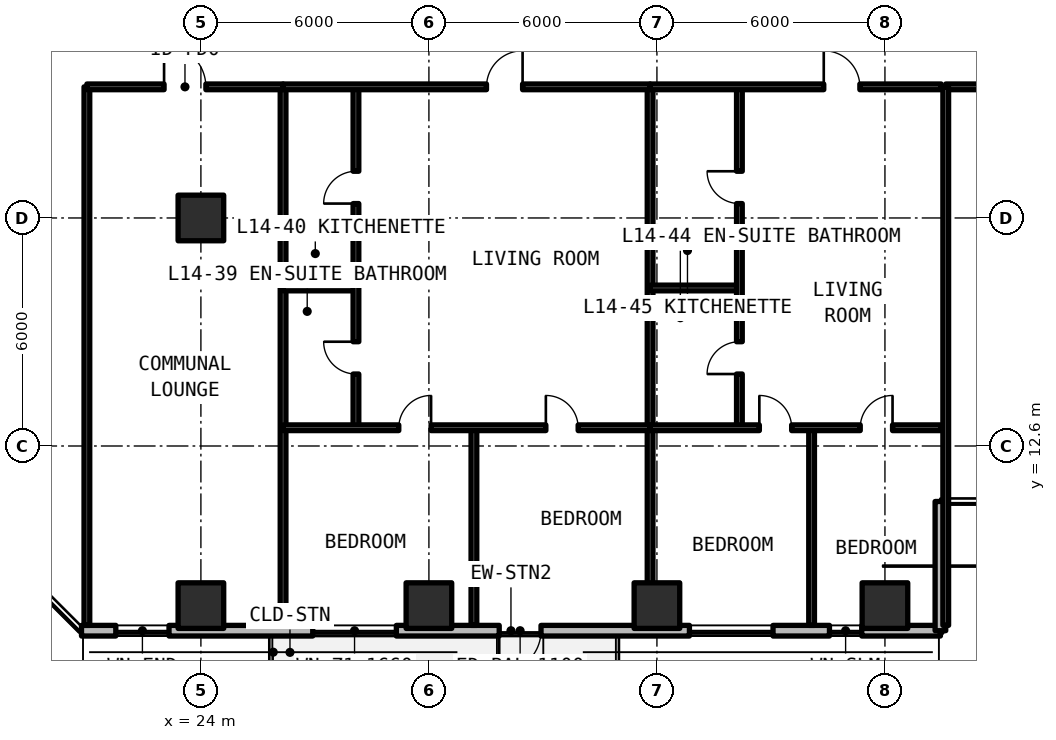
"""IFC4 building model, lengths in metres.
Left out: names, types, materials, properties, quantities, classifications, styles, units other than length and angle.
Written with IfcOpenShell. Run it as: python <this file> out.ifc"""

import sys

from ifc_helpers import new_model, si_unit, direction, frame, frame_2d, origin, origin_2d, place, context, subcontext, project, spatial, rectangle, extrude, element, fill, save


model = new_model("IFC4")
c1 = context("Model", 3, precision=1e-05, world=origin(), true_north=direction((0.0, 1.0)))
c2 = subcontext(c1, "Body", "Model", "MODEL_VIEW")
j1 = project(units=[si_unit("LENGTHUNIT", "METRE"), si_unit("PLANEANGLEUNIT", "RADIAN")], contexts=[c1])
p1 = place(None, origin())
s1 = spatial("IfcSite", under=j1, at=p1, CompositionType="ELEMENT")
p2 = place(p1, origin())
s2 = spatial("IfcBuilding", under=s1, at=p2, CompositionType="ELEMENT")
p3 = place(p2, frame((0.0, 0.0, 52.14)))
s3 = spatial("IfcBuildingStorey", under=s2, at=p3, CompositionType="ELEMENT", Elevation=52.14)
for number, where, z_axis, x_axis in (
    (1, (24.0, 18.6, 0.0), (0.0, 0.0, 1.0), (1.0, 0.0, 0.0)),
    (2, (24.0, 8.4, 0.0), (0.0, 0.0, 1.0), (1.0, 0.0, 0.0)),
    (3, (30.0, 8.4, 0.0), (0.0, 0.0, 1.0), (1.0, 0.0, 0.0)),
    (4, (36.0, 8.4, 0.0), (0.0, 0.0, 1.0), (1.0, 0.0, 0.0)),
    (5, (42.0, 8.4, 0.0), (0.0, 0.0, 1.0), (1.0, 0.0, 0.0)),
):
    element("IfcColumn", number, at=place(p3, frame(where, z_axis=z_axis, x_axis=x_axis)), inside=s3, PredefinedType="COLUMN", context=c2, shape_type="SweptSolid", body=[
        extrude(rectangle(XDim=1.2, YDim=1.2, at=origin_2d()), origin(), (0.0, 0.0, 1.0), 3.3),
    ])
p4 = place(p3, frame((20.858, 7.74, 0.0), z_axis=(0.0, 0.0, 1.0), x_axis=(1.0, 0.0, 0.0)))
e6 = element("IfcWall", 6, at=p4, inside=s3, PredefinedType="SOLIDWALL", context=c2, shape_type="SweptSolid", body=[
    extrude(rectangle(XDim=22.602, YDim=0.28, at=frame_2d((11.301, 0.0))), origin(), (0.0, 0.0, 1.0), 3.08),
])
p5 = place(p4, frame((10.992, 0.0, 0.0)))
e7 = element("IfcOpeningElement", 7, at=p5, cuts=e6, PredefinedType="OPENING", context=c2, shape_type="SweptSolid", body=[
    extrude(rectangle(XDim=1.1, YDim=2.15, at=frame_2d((0.55, 1.075))), frame((0.0, 0.15, 0.0), z_axis=(0.0, -1.0, 0.0), x_axis=(1.0, 0.0, 0.0)), (0.0, 0.0, 1.0), 0.3),
])
p6 = place(p4, frame((0.903, 0.0, 0.78)))
e8 = element("IfcOpeningElement", 8, at=p6, cuts=e6, PredefinedType="OPENING", context=c2, shape_type="SweptSolid", body=[
    extrude(rectangle(XDim=1.4, YDim=1.65, at=frame_2d((0.7, 0.825))), frame((0.0, 0.15, 0.0), z_axis=(0.0, -1.0, 0.0), x_axis=(1.0, 0.0, 0.0)), (0.0, 0.0, 1.0), 0.3),
])
p7 = place(p4, frame((6.085, 0.0, 0.78)))
e9 = element("IfcOpeningElement", 9, at=p7, cuts=e6, PredefinedType="OPENING", context=c2, shape_type="SweptSolid", body=[
    extrude(rectangle(XDim=2.2, YDim=1.66, at=frame_2d((1.1, 0.83))), frame((0.0, 0.15, 0.0), z_axis=(0.0, -1.0, 0.0), x_axis=(1.0, 0.0, 0.0)), (0.0, 0.0, 1.0), 0.3),
])
p8 = place(p4, frame((15.997, 0.0, 0.78)))
e10 = element("IfcOpeningElement", 10, at=p8, cuts=e6, PredefinedType="OPENING", context=c2, shape_type="SweptSolid", body=[
    extrude(rectangle(XDim=2.2, YDim=1.66, at=frame_2d((1.1, 0.83))), frame((0.0, 0.15, 0.0), z_axis=(0.0, -1.0, 0.0), x_axis=(1.0, 0.0, 0.0)), (0.0, 0.0, 1.0), 0.3),
])
p9 = place(p4, frame((19.682, 0.0, 0.78)))
e11 = element("IfcOpeningElement", 11, at=p9, cuts=e6, PredefinedType="OPENING", context=c2, shape_type="SweptSolid", body=[
    extrude(rectangle(XDim=0.85, YDim=1.65, at=frame_2d((0.425, 0.825))), frame((0.0, 0.15, 0.0), z_axis=(0.0, -1.0, 0.0), x_axis=(1.0, 0.0, 0.0)), (0.0, 0.0, 1.0), 0.3),
])
p10 = place(p3, frame((43.46, 7.74, 0.0), z_axis=(0.0, 0.0, 1.0), x_axis=(0.0, 1.0, 0.0)))
e12 = element("IfcWall", 12, at=p10, inside=s3, PredefinedType="SOLIDWALL", context=c2, shape_type="SweptSolid", body=[
    extrude(rectangle(XDim=3.4, YDim=0.28, at=frame_2d((1.7, 0.0))), origin(), (0.0, 0.0, 1.0), 3.08),
])
p11 = place(p3, frame((43.6, 22.05, 0.0), z_axis=(0.0, 0.0, 1.0), x_axis=(1.0, 0.0, 0.0)))
e13 = element("IfcWall", 13, at=p11, inside=s3, PredefinedType="SOLIDWALL", context=c2, shape_type="SweptSolid", body=[
    extrude(rectangle(XDim=8.4, YDim=0.15, at=frame_2d((4.2, 0.0))), origin(), (0.0, 0.0, 1.0), 2.35),
])
p12 = place(p11, frame((3.65, 0.0, 0.0)))
e14 = element("IfcOpeningElement", 14, at=p12, cuts=e13, PredefinedType="OPENING", context=c2, shape_type="SweptSolid", body=[
    extrude(rectangle(XDim=1.1, YDim=2.15, at=frame_2d((0.55, 1.075))), frame((0.0, 0.085, 0.0), z_axis=(0.0, -1.0, 0.0), x_axis=(1.0, 0.0, 0.0)), (0.0, 0.0, 1.0), 0.17),
])
for number, where, z_axis, x_axis in (
    (15, (43.6, 7.88, 0.0), (0.0, 0.0, 1.0), (0.0, 1.0, 0.0)),
    (16, (21.0, 7.88, 0.0), (0.0, 0.0, 1.0), (0.0, 1.0, 0.0)),
    (17, (26.162, 7.88, 0.0), (0.0, 0.0, 1.0), (0.0, 1.0, 0.0)),
):
    element("IfcWall", number, at=place(p3, frame(where, z_axis=z_axis, x_axis=x_axis)), inside=s3, PredefinedType="SOLIDWALL", context=c2, shape_type="SweptSolid", body=[
        extrude(rectangle(XDim=14.17, YDim=0.15, at=frame_2d((7.085, 0.0))), origin(), (0.0, 0.0, 1.0), 2.35),
    ])
p13 = place(p3, frame((21.0, 22.05, 0.0), z_axis=(0.0, 0.0, 1.0), x_axis=(1.0, 0.0, 0.0)))
e18 = element("IfcWall", 18, at=p13, inside=s3, PredefinedType="SOLIDWALL", context=c2, shape_type="SweptSolid", body=[
    extrude(rectangle(XDim=5.162, YDim=0.15, at=frame_2d((2.581, 0.0))), origin(), (0.0, 0.0, 1.0), 2.35),
])
p14 = place(p13, frame((2.031, 0.0, 0.0)))
e19 = element("IfcOpeningElement", 19, at=p14, cuts=e18, PredefinedType="OPENING", context=c2, shape_type="SweptSolid", body=[
    extrude(rectangle(XDim=1.1, YDim=2.15, at=frame_2d((0.55, 1.075))), frame((0.0, 0.085, 0.0), z_axis=(0.0, -1.0, 0.0), x_axis=(1.0, 0.0, 0.0)), (0.0, 0.0, 1.0), 0.17),
])
p15 = place(p3, frame((35.82, 7.88, 0.0), z_axis=(0.0, 0.0, 1.0), x_axis=(0.0, 1.0, 0.0)))
e20 = element("IfcWall", 20, at=p15, inside=s3, PredefinedType="SOLIDWALL", context=c2, shape_type="SweptSolid", body=[
    extrude(rectangle(XDim=14.17, YDim=0.15, at=frame_2d((7.085, 0.0))), origin(), (0.0, 0.0, 1.0), 2.35),
])
p16 = place(p3, frame((26.162, 16.758, 0.0), z_axis=(0.0, 0.0, 1.0), x_axis=(1.0, 0.0, 0.0)))
e21 = element("IfcWall", 21, at=p16, inside=s3, PredefinedType="PARTITIONING", context=c2, shape_type="SweptSolid", body=[
    extrude(rectangle(XDim=1.918, YDim=0.15, at=frame_2d((0.959, 0.0))), origin(), (0.0, 0.0, 1.0), 2.35),
])
p17 = place(p3, frame((28.08, 13.08, 0.0), z_axis=(0.0, 0.0, 1.0), x_axis=(0.0, 1.0, 0.0)))
e22 = element("IfcWall", 22, at=p17, inside=s3, PredefinedType="PARTITIONING", context=c2, shape_type="SweptSolid", body=[
    extrude(rectangle(XDim=8.97, YDim=0.15, at=frame_2d((4.485, 0.0))), origin(), (0.0, 0.0, 1.0), 2.35),
])
p18 = place(p17, frame((1.414, 0.0, 0.0)))
e23 = element("IfcOpeningElement", 23, at=p18, cuts=e22, PredefinedType="OPENING", context=c2, shape_type="SweptSolid", body=[
    extrude(rectangle(XDim=0.85, YDim=2.1, at=frame_2d((0.425, 1.05))), frame((0.0, 0.085, 0.0), z_axis=(0.0, -1.0, 0.0), x_axis=(1.0, 0.0, 0.0)), (0.0, 0.0, 1.0), 0.17),
])
p19 = place(p17, frame((5.899, 0.0, 0.0)))
e24 = element("IfcOpeningElement", 24, at=p19, cuts=e22, PredefinedType="OPENING", context=c2, shape_type="SweptSolid", body=[
    extrude(rectangle(XDim=0.85, YDim=2.1, at=frame_2d((0.425, 1.05))), frame((0.0, 0.085, 0.0), z_axis=(0.0, -1.0, 0.0), x_axis=(1.0, 0.0, 0.0)), (0.0, 0.0, 1.0), 0.17),
])
p20 = place(p3, frame((31.184, 7.88, 0.0), z_axis=(0.0, 0.0, 1.0), x_axis=(0.0, 1.0, 0.0)))
e25 = element("IfcWall", 25, at=p20, inside=s3, PredefinedType="PARTITIONING", context=c2, shape_type="SweptSolid", body=[
    extrude(rectangle(XDim=5.2, YDim=0.15, at=frame_2d((2.6, 0.0))), origin(), (0.0, 0.0, 1.0), 2.35),
])
p21 = place(p3, frame((26.162, 13.08, 0.0), z_axis=(0.0, 0.0, 1.0), x_axis=(1.0, 0.0, 0.0)))
e26 = element("IfcWall", 26, at=p21, inside=s3, PredefinedType="PARTITIONING", context=c2, shape_type="SweptSolid", body=[
    extrude(rectangle(XDim=9.658, YDim=0.15, at=frame_2d((4.829, 0.0))), origin(), (0.0, 0.0, 1.0), 2.35),
])
p22 = place(p21, frame((3.045, 0.0, 0.0)))
e27 = element("IfcOpeningElement", 27, at=p22, cuts=e26, PredefinedType="OPENING", context=c2, shape_type="SweptSolid", body=[
    extrude(rectangle(XDim=0.85, YDim=2.1, at=frame_2d((0.425, 1.05))), frame((0.0, 0.085, 0.0), z_axis=(0.0, -1.0, 0.0), x_axis=(1.0, 0.0, 0.0)), (0.0, 0.0, 1.0), 0.17),
])
p23 = place(p21, frame((6.915, 0.0, 0.0)))
e28 = element("IfcOpeningElement", 28, at=p23, cuts=e26, PredefinedType="OPENING", context=c2, shape_type="SweptSolid", body=[
    extrude(rectangle(XDim=0.85, YDim=2.1, at=frame_2d((0.425, 1.05))), frame((0.0, 0.085, 0.0), z_axis=(0.0, -1.0, 0.0), x_axis=(1.0, 0.0, 0.0)), (0.0, 0.0, 1.0), 0.17),
])
p24 = place(p3, frame((26.162, 22.05, 0.0), z_axis=(0.0, 0.0, 1.0), x_axis=(1.0, 0.0, 0.0)))
e29 = element("IfcWall", 29, at=p24, inside=s3, PredefinedType="SOLIDWALL", context=c2, shape_type="SweptSolid", body=[
    extrude(rectangle(XDim=9.658, YDim=0.15, at=frame_2d((4.829, 0.0))), origin(), (0.0, 0.0, 1.0), 2.35),
])
p25 = place(p24, frame((5.353, 0.0, 0.0)))
e30 = element("IfcOpeningElement", 30, at=p25, cuts=e29, PredefinedType="OPENING", context=c2, shape_type="SweptSolid", body=[
    extrude(rectangle(XDim=0.95, YDim=2.15, at=frame_2d((0.475, 1.075))), frame((0.0, 0.085, 0.0), z_axis=(0.0, -1.0, 0.0), x_axis=(1.0, 0.0, 0.0)), (0.0, 0.0, 1.0), 0.17),
])
p26 = place(p3, frame((35.82, 16.758, 0.0), z_axis=(0.0, 0.0, 1.0), x_axis=(1.0, 0.0, 0.0)))
e31 = element("IfcWall", 31, at=p26, inside=s3, PredefinedType="PARTITIONING", context=c2, shape_type="SweptSolid", body=[
    extrude(rectangle(XDim=2.35, YDim=0.15, at=frame_2d((1.175, 0.0))), origin(), (0.0, 0.0, 1.0), 2.35),
])
p27 = place(p3, frame((38.17, 13.08, 0.0), z_axis=(0.0, 0.0, 1.0), x_axis=(0.0, 1.0, 0.0)))
e32 = element("IfcWall", 32, at=p27, inside=s3, PredefinedType="PARTITIONING", context=c2, shape_type="SweptSolid", body=[
    extrude(rectangle(XDim=8.97, YDim=0.15, at=frame_2d((4.485, 0.0))), origin(), (0.0, 0.0, 1.0), 2.35),
])
p28 = place(p27, frame((1.414, 0.0, 0.0)))
e33 = element("IfcOpeningElement", 33, at=p28, cuts=e32, PredefinedType="OPENING", context=c2, shape_type="SweptSolid", body=[
    extrude(rectangle(XDim=0.85, YDim=2.1, at=frame_2d((0.425, 1.05))), frame((0.0, 0.085, 0.0), z_axis=(0.0, -1.0, 0.0), x_axis=(1.0, 0.0, 0.0)), (0.0, 0.0, 1.0), 0.17),
])
p29 = place(p27, frame((5.899, 0.0, 0.0)))
e34 = element("IfcOpeningElement", 34, at=p29, cuts=e32, PredefinedType="OPENING", context=c2, shape_type="SweptSolid", body=[
    extrude(rectangle(XDim=0.85, YDim=2.1, at=frame_2d((0.425, 1.05))), frame((0.0, 0.085, 0.0), z_axis=(0.0, -1.0, 0.0), x_axis=(1.0, 0.0, 0.0)), (0.0, 0.0, 1.0), 0.17),
])
p30 = place(p3, frame((40.07, 7.88, 0.0), z_axis=(0.0, 0.0, 1.0), x_axis=(0.0, 1.0, 0.0)))
e35 = element("IfcWall", 35, at=p30, inside=s3, PredefinedType="PARTITIONING", context=c2, shape_type="SweptSolid", body=[
    extrude(rectangle(XDim=5.2, YDim=0.15, at=frame_2d((2.6, 0.0))), origin(), (0.0, 0.0, 1.0), 2.35),
])
p31 = place(p3, frame((35.82, 13.08, 0.0), z_axis=(0.0, 0.0, 1.0), x_axis=(1.0, 0.0, 0.0)))
e36 = element("IfcWall", 36, at=p31, inside=s3, PredefinedType="PARTITIONING", context=c2, shape_type="SweptSolid", body=[
    extrude(rectangle(XDim=7.66, YDim=0.15, at=frame_2d((3.83, 0.0))), origin(), (0.0, 0.0, 1.0), 2.35),
])
p32 = place(p31, frame((2.875, 0.0, 0.0)))
e37 = element("IfcOpeningElement", 37, at=p32, cuts=e36, PredefinedType="OPENING", context=c2, shape_type="SweptSolid", body=[
    extrude(rectangle(XDim=0.85, YDim=2.1, at=frame_2d((0.425, 1.05))), frame((0.0, 0.085, 0.0), z_axis=(0.0, -1.0, 0.0), x_axis=(1.0, 0.0, 0.0)), (0.0, 0.0, 1.0), 0.17),
])
p33 = place(p31, frame((5.53, 0.0, 0.0)))
e38 = element("IfcOpeningElement", 38, at=p33, cuts=e36, PredefinedType="OPENING", context=c2, shape_type="SweptSolid", body=[
    extrude(rectangle(XDim=0.85, YDim=2.1, at=frame_2d((0.425, 1.05))), frame((0.0, 0.085, 0.0), z_axis=(0.0, -1.0, 0.0), x_axis=(1.0, 0.0, 0.0)), (0.0, 0.0, 1.0), 0.17),
])
p34 = place(p3, frame((35.82, 22.05, 0.0), z_axis=(0.0, 0.0, 1.0), x_axis=(1.0, 0.0, 0.0)))
e39 = element("IfcWall", 39, at=p34, inside=s3, PredefinedType="SOLIDWALL", context=c2, shape_type="SweptSolid", body=[
    extrude(rectangle(XDim=7.66, YDim=0.15, at=frame_2d((3.83, 0.0))), origin(), (0.0, 0.0, 1.0), 2.35),
])
p35 = place(p34, frame((4.57, 0.0, 0.0)))
e40 = element("IfcOpeningElement", 40, at=p35, cuts=e39, PredefinedType="OPENING", context=c2, shape_type="SweptSolid", body=[
    extrude(rectangle(XDim=0.95, YDim=2.15, at=frame_2d((0.475, 1.075))), frame((0.0, 0.085, 0.0), z_axis=(0.0, -1.0, 0.0), x_axis=(1.0, 0.0, 0.0)), (0.0, 0.0, 1.0), 0.17),
])
p36 = place(p5, frame((1.1, 0.0, 0.0), z_axis=(0.0, 0.0, 1.0), x_axis=(-1.0, 0.0, 0.0)))
e41 = element("IfcDoor", 41, at=p36, inside=s3, OperationType="SINGLE_SWING_RIGHT", PredefinedType="DOOR", context=c2, shape_type="SweptSolid", body=[
    extrude(rectangle(XDim=1.1, YDim=2.15, at=frame_2d((0.55, 1.075))), frame((0.0, 0.025, 0.0), z_axis=(0.0, -1.0, 0.0), x_axis=(1.0, 0.0, 0.0)), (0.0, 0.0, 1.0), 0.05),
])
fill(e7, e41)
p37 = place(p6, origin())
e42 = element("IfcWindow", 42, at=p37, inside=s3, PartitioningType="SINGLE_PANEL", PredefinedType="WINDOW", context=c2, shape_type="SweptSolid", body=[
    extrude(rectangle(XDim=1.4, YDim=1.65, at=frame_2d((0.7, 0.825))), frame((0.0, 0.03, 0.0), z_axis=(0.0, -1.0, 0.0), x_axis=(1.0, 0.0, 0.0)), (0.0, 0.0, 1.0), 0.06),
])
fill(e8, e42)
p38 = place(p7, origin())
e43 = element("IfcWindow", 43, at=p38, inside=s3, PartitioningType="SINGLE_PANEL", PredefinedType="WINDOW", context=c2, shape_type="SweptSolid", body=[
    extrude(rectangle(XDim=2.2, YDim=1.66, at=frame_2d((1.1, 0.83))), frame((0.0, 0.03, 0.0), z_axis=(0.0, -1.0, 0.0), x_axis=(1.0, 0.0, 0.0)), (0.0, 0.0, 1.0), 0.06),
])
fill(e9, e43)
p39 = place(p8, origin())
e44 = element("IfcWindow", 44, at=p39, inside=s3, PartitioningType="SINGLE_PANEL", PredefinedType="WINDOW", context=c2, shape_type="SweptSolid", body=[
    extrude(rectangle(XDim=2.2, YDim=1.66, at=frame_2d((1.1, 0.83))), frame((0.0, 0.03, 0.0), z_axis=(0.0, -1.0, 0.0), x_axis=(1.0, 0.0, 0.0)), (0.0, 0.0, 1.0), 0.06),
])
fill(e10, e44)
p40 = place(p9, origin())
e45 = element("IfcWindow", 45, at=p40, inside=s3, PartitioningType="SINGLE_PANEL", PredefinedType="WINDOW", context=c2, shape_type="SweptSolid", body=[
    extrude(rectangle(XDim=0.85, YDim=1.65, at=frame_2d((0.425, 0.825))), frame((0.0, 0.03, 0.0), z_axis=(0.0, -1.0, 0.0), x_axis=(1.0, 0.0, 0.0)), (0.0, 0.0, 1.0), 0.06),
])
fill(e11, e45)
p41 = place(p14, origin())
e46 = element("IfcDoor", 46, at=p41, inside=s3, OperationType="SINGLE_SWING_LEFT", PredefinedType="DOOR", context=c2, shape_type="SweptSolid", body=[
    extrude(rectangle(XDim=1.1, YDim=2.15, at=frame_2d((0.55, 1.075))), frame((0.0, 0.025, 0.0), z_axis=(0.0, -1.0, 0.0), x_axis=(1.0, 0.0, 0.0)), (0.0, 0.0, 1.0), 0.05),
])
fill(e19, e46)
p42 = place(p18, origin())
e47 = element("IfcDoor", 47, at=p42, inside=s3, OperationType="SINGLE_SWING_RIGHT", PredefinedType="DOOR", context=c2, shape_type="SweptSolid", body=[
    extrude(rectangle(XDim=0.85, YDim=2.1, at=frame_2d((0.425, 1.05))), frame((0.0, 0.025, 0.0), z_axis=(0.0, -1.0, 0.0), x_axis=(1.0, 0.0, 0.0)), (0.0, 0.0, 1.0), 0.05),
])
fill(e23, e47)
p43 = place(p19, origin())
e48 = element("IfcDoor", 48, at=p43, inside=s3, OperationType="SINGLE_SWING_LEFT", PredefinedType="DOOR", context=c2, shape_type="SweptSolid", body=[
    extrude(rectangle(XDim=0.85, YDim=2.1, at=frame_2d((0.425, 1.05))), frame((0.0, 0.025, 0.0), z_axis=(0.0, -1.0, 0.0), x_axis=(1.0, 0.0, 0.0)), (0.0, 0.0, 1.0), 0.05),
])
fill(e24, e48)
p44 = place(p22, origin())
e49 = element("IfcDoor", 49, at=p44, inside=s3, OperationType="SINGLE_SWING_RIGHT", PredefinedType="DOOR", context=c2, shape_type="SweptSolid", body=[
    extrude(rectangle(XDim=0.85, YDim=2.1, at=frame_2d((0.425, 1.05))), frame((0.0, 0.025, 0.0), z_axis=(0.0, -1.0, 0.0), x_axis=(1.0, 0.0, 0.0)), (0.0, 0.0, 1.0), 0.05),
])
fill(e27, e49)
p45 = place(p23, origin())
e50 = element("IfcDoor", 50, at=p45, inside=s3, OperationType="SINGLE_SWING_LEFT", PredefinedType="DOOR", context=c2, shape_type="SweptSolid", body=[
    extrude(rectangle(XDim=0.85, YDim=2.1, at=frame_2d((0.425, 1.05))), frame((0.0, 0.025, 0.0), z_axis=(0.0, -1.0, 0.0), x_axis=(1.0, 0.0, 0.0)), (0.0, 0.0, 1.0), 0.05),
])
fill(e28, e50)
p46 = place(p25, origin())
e51 = element("IfcDoor", 51, at=p46, inside=s3, OperationType="SINGLE_SWING_RIGHT", PredefinedType="DOOR", context=c2, shape_type="SweptSolid", body=[
    extrude(rectangle(XDim=0.95, YDim=2.15, at=frame_2d((0.475, 1.075))), frame((0.0, 0.025, 0.0), z_axis=(0.0, -1.0, 0.0), x_axis=(1.0, 0.0, 0.0)), (0.0, 0.0, 1.0), 0.05),
])
fill(e30, e51)
p47 = place(p28, origin())
e52 = element("IfcDoor", 52, at=p47, inside=s3, OperationType="SINGLE_SWING_LEFT", PredefinedType="DOOR", context=c2, shape_type="SweptSolid", body=[
    extrude(rectangle(XDim=0.85, YDim=2.1, at=frame_2d((0.425, 1.05))), frame((0.0, 0.025, 0.0), z_axis=(0.0, -1.0, 0.0), x_axis=(1.0, 0.0, 0.0)), (0.0, 0.0, 1.0), 0.05),
])
fill(e33, e52)
p48 = place(p29, origin())
e53 = element("IfcDoor", 53, at=p48, inside=s3, OperationType="SINGLE_SWING_RIGHT", PredefinedType="DOOR", context=c2, shape_type="SweptSolid", body=[
    extrude(rectangle(XDim=0.85, YDim=2.1, at=frame_2d((0.425, 1.05))), frame((0.0, 0.025, 0.0), z_axis=(0.0, -1.0, 0.0), x_axis=(1.0, 0.0, 0.0)), (0.0, 0.0, 1.0), 0.05),
])
fill(e34, e53)
p49 = place(p32, origin())
e54 = element("IfcDoor", 54, at=p49, inside=s3, OperationType="SINGLE_SWING_LEFT", PredefinedType="DOOR", context=c2, shape_type="SweptSolid", body=[
    extrude(rectangle(XDim=0.85, YDim=2.1, at=frame_2d((0.425, 1.05))), frame((0.0, 0.025, 0.0), z_axis=(0.0, -1.0, 0.0), x_axis=(1.0, 0.0, 0.0)), (0.0, 0.0, 1.0), 0.05),
])
fill(e37, e54)
p50 = place(p33, origin())
e55 = element("IfcDoor", 55, at=p50, inside=s3, OperationType="SINGLE_SWING_RIGHT", PredefinedType="DOOR", context=c2, shape_type="SweptSolid", body=[
    extrude(rectangle(XDim=0.85, YDim=2.1, at=frame_2d((0.425, 1.05))), frame((0.0, 0.025, 0.0), z_axis=(0.0, -1.0, 0.0), x_axis=(1.0, 0.0, 0.0)), (0.0, 0.0, 1.0), 0.05),
])
fill(e38, e55)
p51 = place(p35, origin())
e56 = element("IfcDoor", 56, at=p51, inside=s3, OperationType="SINGLE_SWING_LEFT", PredefinedType="DOOR", context=c2, shape_type="SweptSolid", body=[
    extrude(rectangle(XDim=0.95, YDim=2.15, at=frame_2d((0.475, 1.075))), frame((0.0, 0.025, 0.0), z_axis=(0.0, -1.0, 0.0), x_axis=(1.0, 0.0, 0.0)), (0.0, 0.0, 1.0), 0.05),
])
fill(e40, e56)
save(model, sys.argv[1])
